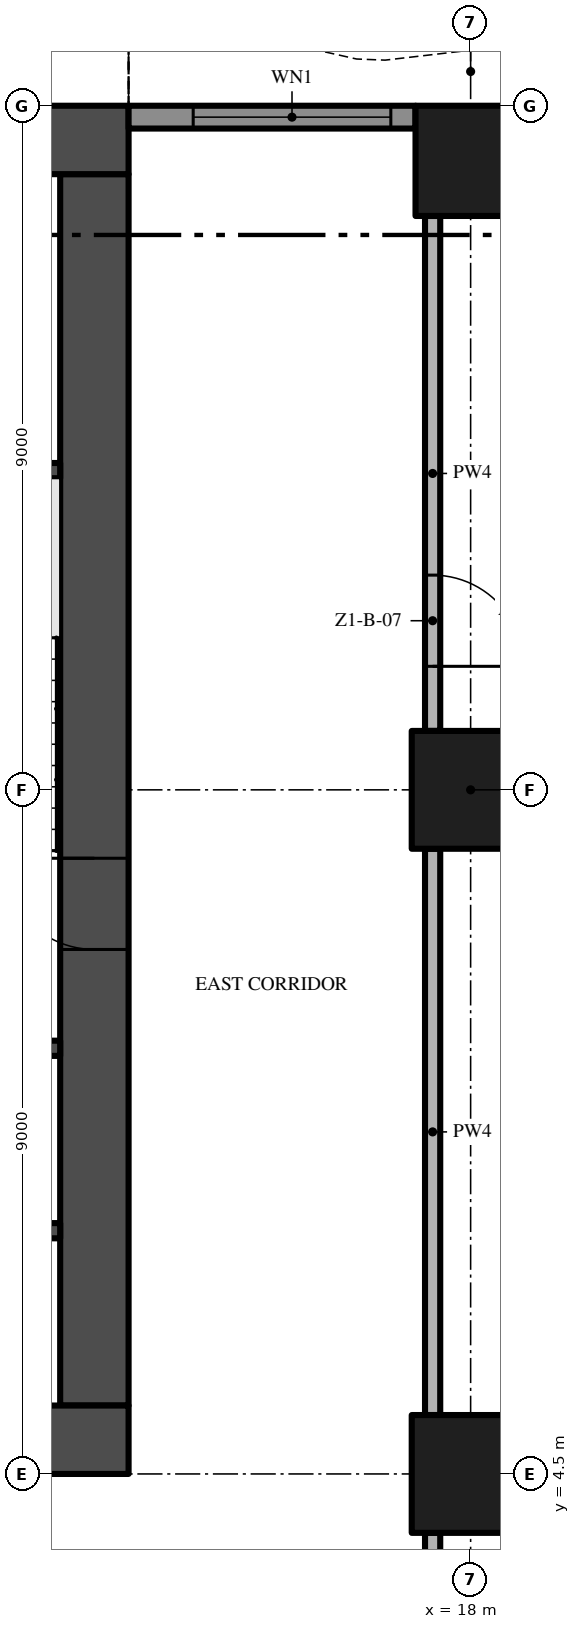
"""IFC4 building model, lengths in metres.
Left out: names, types, materials, properties, quantities, classifications, styles, units other than length and angle.
Written with IfcOpenShell. Run it as: python <this file> out.ifc"""

import sys

from ifc_helpers import new_model, si_unit, direction, frame, frame_2d, origin, origin_2d, place, context, subcontext, project, spatial, polyline, rectangle, outline, extrude, element, fill, save


model = new_model("IFC4")
c1 = context("Model", 3, precision=1e-05, world=origin(), true_north=direction((0.0, 1.0)))
c2 = subcontext(c1, "Body", "Model", "MODEL_VIEW")
j1 = project(units=[si_unit("LENGTHUNIT", "METRE"), si_unit("PLANEANGLEUNIT", "RADIAN")], contexts=[c1])
p1 = place(None, origin())
s1 = spatial("IfcSite", under=j1, at=p1, CompositionType="ELEMENT")
p2 = place(p1, origin())
s2 = spatial("IfcBuilding", under=s1, at=p2, CompositionType="ELEMENT")
p3 = place(p2, frame((0.0, 0.0, 26.4)))
s3 = spatial("IfcBuildingStorey", under=s2, at=p3, CompositionType="ELEMENT", Elevation=26.4)
p4 = place(p3, frame((-13.5, 4.95, -0.3), z_axis=(0.0, 0.0, 1.0), x_axis=(1.0, 0.0, 0.0)))
e1 = element("IfcWall", 1, at=p4, inside=s3, PredefinedType="SHEAR", context=c2, shape_type="SweptSolid", body=[
    extrude(rectangle(XDim=27.0, YDim=0.9, at=frame_2d((13.5, 0.0))), origin(), (0.0, 0.0, 1.0), 3.8),
])
p5 = place(p4, frame((12.0, 0.0, 0.3)))
e2 = element("IfcOpeningElement", 2, at=p5, cuts=e1, PredefinedType="OPENING", context=c2, shape_type="SweptSolid", body=[
    extrude(rectangle(XDim=3.0, YDim=2.4, at=frame_2d((1.5, 1.2))), frame((0.0, 0.46, 0.0), z_axis=(0.0, -1.0, 0.0), x_axis=(1.0, 0.0, 0.0)), (0.0, 0.0, 1.0), 0.92),
])
p6 = place(p4, frame((4.9, 0.0, 0.3)))
e3 = element("IfcOpeningElement", 3, at=p6, cuts=e1, PredefinedType="OPENING", context=c2, shape_type="SweptSolid", body=[
    extrude(rectangle(XDim=1.2, YDim=2.2, at=frame_2d((0.6, 1.1))), frame((0.0, 0.46, 0.0), z_axis=(0.0, -1.0, 0.0), x_axis=(1.0, 0.0, 0.0)), (0.0, 0.0, 1.0), 0.92),
])
p7 = place(p4, frame((20.75, 0.0, 0.3)))
e4 = element("IfcOpeningElement", 4, at=p7, cuts=e1, PredefinedType="OPENING", context=c2, shape_type="SweptSolid", body=[
    extrude(rectangle(XDim=1.5, YDim=2.2, at=frame_2d((0.75, 1.1))), frame((0.0, 0.46, 0.0), z_axis=(0.0, -1.0, 0.0), x_axis=(1.0, 0.0, 0.0)), (0.0, 0.0, 1.0), 0.92),
])
p8 = place(p4, frame((17.4, 0.0, 0.3)))
e5 = element("IfcOpeningElement", 5, at=p8, cuts=e1, PredefinedType="OPENING", context=c2, shape_type="SweptSolid", body=[
    extrude(rectangle(XDim=1.2, YDim=2.2, at=frame_2d((0.6, 1.1))), frame((0.0, 0.46, 0.0), z_axis=(0.0, -1.0, 0.0), x_axis=(1.0, 0.0, 0.0)), (0.0, 0.0, 1.0), 0.92),
])
p9 = place(p3, frame((13.05, 5.4, -0.3), z_axis=(0.0, 0.0, 1.0), x_axis=(0.0, 1.0, 0.0)))
e6 = element("IfcWall", 6, at=p9, inside=s3, PredefinedType="SHEAR", context=c2, shape_type="SweptSolid", body=[
    extrude(rectangle(XDim=16.2, YDim=0.9, at=frame_2d((8.1, 0.0))), origin(), (0.0, 0.0, 1.0), 3.8),
])
p10 = place(p9, frame((6.0, 0.0, 0.3)))
e7 = element("IfcOpeningElement", 7, at=p10, cuts=e6, PredefinedType="OPENING", context=c2, shape_type="SweptSolid", body=[
    extrude(rectangle(XDim=1.2, YDim=2.2, at=frame_2d((0.6, 1.1))), frame((0.0, 0.46, 0.0), z_axis=(0.0, -1.0, 0.0), x_axis=(1.0, 0.0, 0.0)), (0.0, 0.0, 1.0), 0.92),
])
p11 = place(p3, frame((13.5, 22.05, -0.3), z_axis=(0.0, 0.0, 1.0), x_axis=(-1.0, 0.0, 0.0)))
e8 = element("IfcWall", 8, at=p11, inside=s3, PredefinedType="SHEAR", context=c2, shape_type="SweptSolid", body=[
    extrude(rectangle(XDim=27.0, YDim=0.9, at=frame_2d((13.5, 0.0))), origin(), (0.0, 0.0, 1.0), 3.8),
])
p12 = place(p3, frame((18.0, 13.5, 0.0), z_axis=(0.0, 0.0, 1.0), x_axis=(1.0, 0.0, 0.0)))
e9 = element("IfcColumn", 9, at=p12, inside=s3, PredefinedType="COLUMN", context=c2, shape_type="SweptSolid", body=[
    extrude(rectangle(XDim=1.55, YDim=1.55, at=origin_2d()), origin(), (0.0, 0.0, 1.0), 3.5),
])
p13 = place(p3, frame((18.0, 21.775, 0.0), z_axis=(0.0, 0.0, 1.0), x_axis=(1.0, 0.0, 0.0)))
e10 = element("IfcColumn", 10, at=p13, inside=s3, PredefinedType="COLUMN", context=c2, shape_type="SweptSolid", body=[
    extrude(rectangle(XDim=1.45, YDim=1.45, at=origin_2d()), origin(), (0.0, 0.0, 1.0), 3.5),
])
p14 = place(p3, frame((18.0, 4.5, 0.0), z_axis=(0.0, 0.0, 1.0), x_axis=(1.0, 0.0, 0.0)))
e11 = element("IfcColumn", 11, at=p14, inside=s3, PredefinedType="COLUMN", context=c2, shape_type="SweptSolid", body=[
    extrude(rectangle(XDim=1.55, YDim=1.55, at=origin_2d()), origin(), (0.0, 0.0, 1.0), 3.5),
])
p15 = place(p3, frame((13.5, 22.35, 0.0), z_axis=(0.0, 0.0, 1.0), x_axis=(1.0, 0.0, 0.0)))
e12 = element("IfcWall", 12, at=p15, inside=s3, PredefinedType="SOLIDWALL", context=c2, shape_type="SweptSolid", body=[
    extrude(rectangle(XDim=3.775, YDim=0.3, at=frame_2d((1.887, 0.0))), origin(), (0.0, 0.0, 1.0), 3.5),
])
p16 = place(p15, frame((0.85, 0.0, 0.45)))
e13 = element("IfcOpeningElement", 13, at=p16, cuts=e12, PredefinedType="OPENING", context=c2, shape_type="SweptSolid", body=[
    extrude(rectangle(XDim=2.6, YDim=2.65, at=frame_2d((1.3, 1.325))), frame((0.0, 0.16, 0.0), z_axis=(0.0, -1.0, 0.0), x_axis=(1.0, 0.0, 0.0)), (0.0, 0.0, 1.0), 0.32),
])
p17 = place(p3, origin())
e14 = element("IfcWall", 14, at=p17, inside=s3, PredefinedType="USERDEFINED", context=c2, shape_type="SweptSolid", body=[
    extrude(outline(polyline([(22.5, 25.149), (21.0, 24.488), (19.5, 23.755), (18.0, 23.231), (16.875, 23.1), (16.5, 23.115), (15.0, 23.451), (13.5, 24.112), (13.399, 23.883), (14.921, 23.213), (16.467, 22.866), (16.885, 22.849), (18.056, 22.986), (19.596, 23.524), (21.105, 24.261), (22.601, 24.92), (22.5, 25.149)])), origin(), (0.0, 0.0, 1.0), 0.9),
])
for number, where, z_axis, x_axis in (
    (15, (9.65, 7.7, 0.0), (0.0, 0.0, 1.0), (1.0, 0.0, 0.0)),
    (16, (9.65, 10.1, 0.0), (0.0, 0.0, 1.0), (1.0, 0.0, 0.0)),
    (17, (9.65, 17.7, 0.0), (0.0, 0.0, 1.0), (1.0, 0.0, 0.0)),
):
    element("IfcWall", number, at=place(p3, frame(where, z_axis=z_axis, x_axis=x_axis)), inside=s3, PredefinedType="SHEAR", context=c2, shape_type="SweptSolid", body=[
        extrude(rectangle(XDim=2.95, YDim=0.2, at=frame_2d((1.475, 0.0))), origin(), (0.0, 0.0, 1.0), 3.5),
    ])
p18 = place(p3, frame((17.5, -0.2, 0.0), z_axis=(0.0, 0.0, 1.0), x_axis=(0.0, 1.0, 0.0)))
e18 = element("IfcWall", 18, at=p18, inside=s3, PredefinedType="PARTITIONING", context=c2, shape_type="SweptSolid", body=[
    extrude(rectangle(XDim=3.925, YDim=0.2, at=frame_2d((1.962, 0.0))), origin(), (0.0, 0.0, 1.0), 3.5),
])
p19 = place(p3, frame((17.5, 5.275, 0.0), z_axis=(0.0, 0.0, 1.0), x_axis=(0.0, 1.0, 0.0)))
e19 = element("IfcWall", 19, at=p19, inside=s3, PredefinedType="PARTITIONING", context=c2, shape_type="SweptSolid", body=[
    extrude(rectangle(XDim=7.45, YDim=0.2, at=frame_2d((3.725, 0.0))), origin(), (0.0, 0.0, 1.0), 3.5),
])
p20 = place(p3, frame((17.5, 21.05, 0.0), z_axis=(0.0, 0.0, 1.0), x_axis=(0.0, -1.0, 0.0)))
e20 = element("IfcWall", 20, at=p20, inside=s3, PredefinedType="PARTITIONING", context=c2, shape_type="SweptSolid", body=[
    extrude(rectangle(XDim=6.775, YDim=0.2, at=frame_2d((3.388, 0.0))), origin(), (0.0, 0.0, 1.0), 3.5),
])
p21 = place(p20, frame((4.725, 0.0, 0.0)))
e21 = element("IfcOpeningElement", 21, at=p21, cuts=e20, PredefinedType="OPENING", context=c2, shape_type="SweptSolid", body=[
    extrude(rectangle(XDim=1.2, YDim=2.4, at=frame_2d((0.6, 1.2))), frame((0.0, 0.11, 0.0), z_axis=(0.0, -1.0, 0.0), x_axis=(1.0, 0.0, 0.0)), (0.0, 0.0, 1.0), 0.22),
])
p22 = place(p16, origin())
e22 = element("IfcWindow", 22, at=p22, inside=s3, PartitioningType="SINGLE_PANEL", PredefinedType="WINDOW", context=c2, shape_type="SweptSolid", body=[
    extrude(rectangle(XDim=2.6, YDim=2.65, at=frame_2d((1.3, 1.325))), frame((0.0, 0.03, 0.0), z_axis=(0.0, -1.0, 0.0), x_axis=(1.0, 0.0, 0.0)), (0.0, 0.0, 1.0), 0.06),
])
fill(e13, e22)
p23 = place(p10, frame((1.2, 0.0, 0.0), z_axis=(0.0, 0.0, 1.0), x_axis=(-1.0, 0.0, 0.0)))
e23 = element("IfcDoor", 23, at=p23, inside=s3, OperationType="SINGLE_SWING_LEFT", PredefinedType="DOOR", context=c2, shape_type="SweptSolid", body=[
    extrude(rectangle(XDim=1.2, YDim=2.2, at=frame_2d((0.6, 1.1))), frame((0.0, 0.025, 0.0), z_axis=(0.0, -1.0, 0.0), x_axis=(1.0, 0.0, 0.0)), (0.0, 0.0, 1.0), 0.05),
])
fill(e7, e23)
p24 = place(p21, origin())
e24 = element("IfcDoor", 24, at=p24, inside=s3, OperationType="SINGLE_SWING_RIGHT", PredefinedType="DOOR", context=c2, shape_type="SweptSolid", body=[
    extrude(rectangle(XDim=1.2, YDim=2.4, at=frame_2d((0.6, 1.2))), frame((0.0, 0.025, 0.0), z_axis=(0.0, -1.0, 0.0), x_axis=(1.0, 0.0, 0.0)), (0.0, 0.0, 1.0), 0.05),
])
fill(e21, e24)
save(model, sys.argv[1])
